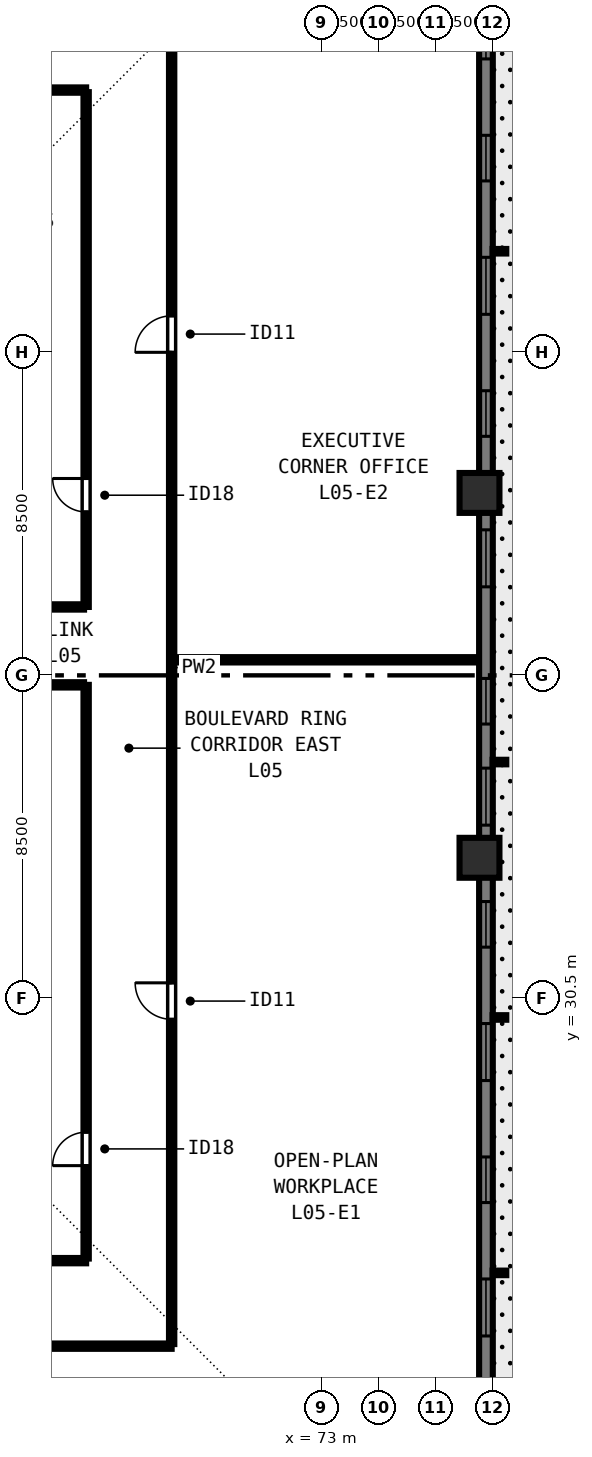
"""IFC4 building model, lengths in metres.
Left out: names, types, materials, properties, quantities, classifications, styles, units other than length and angle.
Written with IfcOpenShell. Run it as: python <this file> out.ifc"""

import sys

from ifc_helpers import new_model, si_unit, direction, frame, frame_2d, origin, origin_2d, place, context, subcontext, project, spatial, rectangle, extrude, element, fill, save


model = new_model("IFC4")
c1 = context("Model", 3, precision=1e-05, world=origin(), true_north=direction((0.0, 1.0)))
c2 = subcontext(c1, "Body", "Model", "MODEL_VIEW")
j1 = project(units=[si_unit("LENGTHUNIT", "METRE"), si_unit("PLANEANGLEUNIT", "RADIAN")], contexts=[c1])
p1 = place(None, origin())
s1 = spatial("IfcSite", under=j1, at=p1, CompositionType="ELEMENT")
p2 = place(p1, origin())
s2 = spatial("IfcBuilding", under=s1, at=p2, CompositionType="ELEMENT")
p3 = place(p2, frame((0.0, 0.0, 23.5)))
s3 = spatial("IfcBuildingStorey", under=s2, at=p3, CompositionType="ELEMENT", Elevation=23.5)
for number, where, z_axis, x_axis in (
    (1, (77.15, 34.2, 0.0), (0.0, 0.0, 1.0), (0.0, 1.0, 0.0)),
    (2, (77.15, 43.8, 0.0), (0.0, 0.0, 1.0), (0.0, 1.0, 0.0)),
):
    element("IfcColumn", number, at=place(p3, frame(where, z_axis=z_axis, x_axis=x_axis)), inside=s3, PredefinedType="COLUMN", context=c2, shape_type="SweptSolid", body=[
        extrude(rectangle(XDim=1.05, YDim=1.05, at=origin_2d()), origin(), (0.0, 0.0, 1.0), 3.5),
    ])
p4 = place(p3, frame((77.32, 61.5, 0.0), z_axis=(0.0, 0.0, 1.0), x_axis=(0.0, -1.0, 0.0)))
e3 = element("IfcWall", 3, at=p4, inside=s3, PredefinedType="SOLIDWALL", context=c2, shape_type="SweptSolid", body=[
    extrude(rectangle(XDim=44.662, YDim=0.36, at=frame_2d((22.331, 0.0))), origin(), (0.0, 0.0, 1.0), 3.28),
])
p5 = place(p4, frame((4.78, 0.0, 0.8)))
e4 = element("IfcOpeningElement", 4, at=p5, cuts=e3, PredefinedType="OPENING", context=c2, shape_type="SweptSolid", body=[
    extrude(rectangle(XDim=1.5, YDim=1.544, at=frame_2d((0.75, 0.772))), frame((0.0, 0.19, 0.0), z_axis=(0.0, -1.0, 0.0), x_axis=(1.0, 0.0, 0.0)), (0.0, 0.0, 1.0), 0.38),
])
p6 = place(p4, frame((8.29, 0.0, 0.8)))
e5 = element("IfcOpeningElement", 5, at=p6, cuts=e3, PredefinedType="OPENING", context=c2, shape_type="SweptSolid", body=[
    extrude(rectangle(XDim=1.2, YDim=1.544, at=frame_2d((0.6, 0.772))), frame((0.0, 0.19, 0.0), z_axis=(0.0, -1.0, 0.0), x_axis=(1.0, 0.0, 0.0)), (0.0, 0.0, 1.0), 0.38),
])
p7 = place(p4, frame((11.5, 0.0, 0.8)))
e6 = element("IfcOpeningElement", 6, at=p7, cuts=e3, PredefinedType="OPENING", context=c2, shape_type="SweptSolid", body=[
    extrude(rectangle(XDim=1.5, YDim=1.544, at=frame_2d((0.75, 0.772))), frame((0.0, 0.19, 0.0), z_axis=(0.0, -1.0, 0.0), x_axis=(1.0, 0.0, 0.0)), (0.0, 0.0, 1.0), 0.38),
])
p8 = place(p4, frame((15.01, 0.0, 0.8)))
e7 = element("IfcOpeningElement", 7, at=p8, cuts=e3, PredefinedType="OPENING", context=c2, shape_type="SweptSolid", body=[
    extrude(rectangle(XDim=1.2, YDim=1.544, at=frame_2d((0.6, 0.772))), frame((0.0, 0.19, 0.0), z_axis=(0.0, -1.0, 0.0), x_axis=(1.0, 0.0, 0.0)), (0.0, 0.0, 1.0), 0.38),
])
p9 = place(p4, frame((18.671, 0.0, 0.8)))
e8 = element("IfcOpeningElement", 8, at=p9, cuts=e3, PredefinedType="OPENING", context=c2, shape_type="SweptSolid", body=[
    extrude(rectangle(XDim=1.5, YDim=1.544, at=frame_2d((0.75, 0.772))), frame((0.0, 0.19, 0.0), z_axis=(0.0, -1.0, 0.0), x_axis=(1.0, 0.0, 0.0)), (0.0, 0.0, 1.0), 0.38),
])
p10 = place(p4, frame((22.581, 0.0, 0.8)))
e9 = element("IfcOpeningElement", 9, at=p10, cuts=e3, PredefinedType="OPENING", context=c2, shape_type="SweptSolid", body=[
    extrude(rectangle(XDim=1.2, YDim=1.544, at=frame_2d((0.6, 0.772))), frame((0.0, 0.19, 0.0), z_axis=(0.0, -1.0, 0.0), x_axis=(1.0, 0.0, 0.0)), (0.0, 0.0, 1.0), 0.38),
])
p11 = place(p4, frame((24.941, 0.0, 0.8)))
e10 = element("IfcOpeningElement", 10, at=p11, cuts=e3, PredefinedType="OPENING", context=c2, shape_type="SweptSolid", body=[
    extrude(rectangle(XDim=1.5, YDim=1.544, at=frame_2d((0.75, 0.772))), frame((0.0, 0.19, 0.0), z_axis=(0.0, -1.0, 0.0), x_axis=(1.0, 0.0, 0.0)), (0.0, 0.0, 1.0), 0.38),
])
p12 = place(p4, frame((28.451, 0.0, 0.8)))
e11 = element("IfcOpeningElement", 11, at=p12, cuts=e3, PredefinedType="OPENING", context=c2, shape_type="SweptSolid", body=[
    extrude(rectangle(XDim=1.2, YDim=1.544, at=frame_2d((0.6, 0.772))), frame((0.0, 0.19, 0.0), z_axis=(0.0, -1.0, 0.0), x_axis=(1.0, 0.0, 0.0)), (0.0, 0.0, 1.0), 0.38),
])
p13 = place(p4, frame((31.662, 0.0, 0.8)))
e12 = element("IfcOpeningElement", 12, at=p13, cuts=e3, PredefinedType="OPENING", context=c2, shape_type="SweptSolid", body=[
    extrude(rectangle(XDim=1.5, YDim=1.544, at=frame_2d((0.75, 0.772))), frame((0.0, 0.19, 0.0), z_axis=(0.0, -1.0, 0.0), x_axis=(1.0, 0.0, 0.0)), (0.0, 0.0, 1.0), 0.38),
])
p14 = place(p4, frame((35.172, 0.0, 0.8)))
e13 = element("IfcOpeningElement", 13, at=p14, cuts=e3, PredefinedType="OPENING", context=c2, shape_type="SweptSolid", body=[
    extrude(rectangle(XDim=1.2, YDim=1.544, at=frame_2d((0.6, 0.772))), frame((0.0, 0.19, 0.0), z_axis=(0.0, -1.0, 0.0), x_axis=(1.0, 0.0, 0.0)), (0.0, 0.0, 1.0), 0.38),
])
p15 = place(p4, frame((38.382, 0.0, 0.8)))
e14 = element("IfcOpeningElement", 14, at=p15, cuts=e3, PredefinedType="OPENING", context=c2, shape_type="SweptSolid", body=[
    extrude(rectangle(XDim=1.5, YDim=1.544, at=frame_2d((0.75, 0.772))), frame((0.0, 0.19, 0.0), z_axis=(0.0, -1.0, 0.0), x_axis=(1.0, 0.0, 0.0)), (0.0, 0.0, 1.0), 0.38),
])
p16 = place(p3, frame((34.95, 21.35, 0.0), z_axis=(0.0, 0.0, 1.0), x_axis=(1.0, 0.0, 0.0)))
e15 = element("IfcWall", 15, at=p16, inside=s3, PredefinedType="PARTITIONING", context=c2, shape_type="SweptSolid", body=[
    extrude(rectangle(XDim=34.1, YDim=0.14, at=frame_2d((17.05, 0.0))), origin(), (0.0, 0.0, 1.0), 3.28),
])
p17 = place(p16, frame((3.938, 0.0, 0.0)))
e16 = element("IfcOpeningElement", 16, at=p17, cuts=e15, PredefinedType="OPENING", context=c2, shape_type="SweptSolid", body=[
    extrude(rectangle(XDim=0.96, YDim=2.12, at=frame_2d((0.48, 1.06))), frame((0.0, 0.08, 0.0), z_axis=(0.0, -1.0, 0.0), x_axis=(1.0, 0.0, 0.0)), (0.0, 0.0, 1.0), 0.16),
])
p18 = place(p16, frame((28.617, 0.0, 0.0)))
e17 = element("IfcOpeningElement", 17, at=p18, cuts=e15, PredefinedType="OPENING", context=c2, shape_type="SweptSolid", body=[
    extrude(rectangle(XDim=0.96, YDim=2.12, at=frame_2d((0.48, 1.06))), frame((0.0, 0.08, 0.0), z_axis=(0.0, -1.0, 0.0), x_axis=(1.0, 0.0, 0.0)), (0.0, 0.0, 1.0), 0.16),
])
p19 = place(p3, frame((69.05, 21.405, 0.0), z_axis=(0.0, 0.0, 1.0), x_axis=(0.0, 1.0, 0.0)))
e18 = element("IfcWall", 18, at=p19, inside=s3, PredefinedType="PARTITIONING", context=c2, shape_type="SweptSolid", body=[
    extrude(rectangle(XDim=35.19, YDim=0.14, at=frame_2d((17.595, 0.0))), origin(), (0.0, 0.0, 1.0), 3.28),
])
p20 = place(p19, frame((8.545, 0.0, 0.0)))
e19 = element("IfcOpeningElement", 19, at=p20, cuts=e18, PredefinedType="OPENING", context=c2, shape_type="SweptSolid", body=[
    extrude(rectangle(XDim=0.96, YDim=2.12, at=frame_2d((0.48, 1.06))), frame((0.0, 0.08, 0.0), z_axis=(0.0, -1.0, 0.0), x_axis=(1.0, 0.0, 0.0)), (0.0, 0.0, 1.0), 0.16),
])
p21 = place(p19, frame((26.095, 0.0, 0.0)))
e20 = element("IfcOpeningElement", 20, at=p21, cuts=e18, PredefinedType="OPENING", context=c2, shape_type="SweptSolid", body=[
    extrude(rectangle(XDim=0.96, YDim=2.12, at=frame_2d((0.48, 1.06))), frame((0.0, 0.08, 0.0), z_axis=(0.0, -1.0, 0.0), x_axis=(1.0, 0.0, 0.0)), (0.0, 0.0, 1.0), 0.16),
])
p22 = place(p3, frame((37.2, 23.6, 0.0), z_axis=(0.0, 0.0, 1.0), x_axis=(1.0, 0.0, 0.0)))
e21 = element("IfcWall", 21, at=p22, inside=s3, PredefinedType="PARTITIONING", context=c2, shape_type="SweptSolid", body=[
    extrude(rectangle(XDim=29.6, YDim=0.14, at=frame_2d((14.8, 0.0))), origin(), (0.0, 0.0, 1.0), 3.28),
])
p23 = place(p22, frame((1.2, 0.0, 0.0)))
e22 = element("IfcOpeningElement", 22, at=p23, cuts=e21, PredefinedType="OPENING", context=c2, shape_type="SweptSolid", body=[
    extrude(rectangle(XDim=0.88, YDim=2.1, at=frame_2d((0.44, 1.05))), frame((0.0, 0.08, 0.0), z_axis=(0.0, -1.0, 0.0), x_axis=(1.0, 0.0, 0.0)), (0.0, 0.0, 1.0), 0.16),
])
p24 = place(p22, frame((11.3, 0.0, 0.0)))
e23 = element("IfcOpeningElement", 23, at=p24, cuts=e21, PredefinedType="OPENING", context=c2, shape_type="SweptSolid", body=[
    extrude(rectangle(XDim=0.88, YDim=2.1, at=frame_2d((0.44, 1.05))), frame((0.0, 0.08, 0.0), z_axis=(0.0, -1.0, 0.0), x_axis=(1.0, 0.0, 0.0)), (0.0, 0.0, 1.0), 0.16),
])
p25 = place(p22, frame((21.8, 0.0, 0.0)))
e24 = element("IfcOpeningElement", 24, at=p25, cuts=e21, PredefinedType="OPENING", context=c2, shape_type="SweptSolid", body=[
    extrude(rectangle(XDim=0.88, YDim=2.1, at=frame_2d((0.44, 1.05))), frame((0.0, 0.08, 0.0), z_axis=(0.0, -1.0, 0.0), x_axis=(1.0, 0.0, 0.0)), (0.0, 0.0, 1.0), 0.16),
])
p26 = place(p3, frame((37.2, 54.4, 0.0), z_axis=(0.0, 0.0, 1.0), x_axis=(1.0, 0.0, 0.0)))
e25 = element("IfcWall", 25, at=p26, inside=s3, PredefinedType="PARTITIONING", context=c2, shape_type="SweptSolid", body=[
    extrude(rectangle(XDim=29.6, YDim=0.14, at=frame_2d((14.8, 0.0))), origin(), (0.0, 0.0, 1.0), 3.28),
])
p27 = place(p26, frame((2.2, 0.0, 0.0)))
e26 = element("IfcOpeningElement", 26, at=p27, cuts=e25, PredefinedType="OPENING", context=c2, shape_type="SweptSolid", body=[
    extrude(rectangle(XDim=0.88, YDim=2.1, at=frame_2d((0.44, 1.05))), frame((0.0, 0.08, 0.0), z_axis=(0.0, -1.0, 0.0), x_axis=(1.0, 0.0, 0.0)), (0.0, 0.0, 1.0), 0.16),
])
p28 = place(p26, frame((15.3, 0.0, 0.0)))
e27 = element("IfcOpeningElement", 27, at=p28, cuts=e25, PredefinedType="OPENING", context=c2, shape_type="SweptSolid", body=[
    extrude(rectangle(XDim=0.88, YDim=2.1, at=frame_2d((0.44, 1.05))), frame((0.0, 0.08, 0.0), z_axis=(0.0, -1.0, 0.0), x_axis=(1.0, 0.0, 0.0)), (0.0, 0.0, 1.0), 0.16),
])
p29 = place(p26, frame((24.8, 0.0, 0.0)))
e28 = element("IfcOpeningElement", 28, at=p29, cuts=e25, PredefinedType="OPENING", context=c2, shape_type="SweptSolid", body=[
    extrude(rectangle(XDim=0.88, YDim=2.1, at=frame_2d((0.44, 1.05))), frame((0.0, 0.08, 0.0), z_axis=(0.0, -1.0, 0.0), x_axis=(1.0, 0.0, 0.0)), (0.0, 0.0, 1.0), 0.16),
])
p30 = place(p3, frame((66.8, 23.655, 0.0), z_axis=(0.0, 0.0, 1.0), x_axis=(0.0, 1.0, 0.0)))
e29 = element("IfcWall", 29, at=p30, inside=s3, PredefinedType="PARTITIONING", context=c2, shape_type="SweptSolid", body=[
    extrude(rectangle(XDim=15.095, YDim=0.14, at=frame_2d((7.547, 0.0))), origin(), (0.0, 0.0, 1.0), 3.28),
])
p31 = place(p30, frame((2.445, 0.0, 0.0)))
e30 = element("IfcOpeningElement", 30, at=p31, cuts=e29, PredefinedType="OPENING", context=c2, shape_type="SweptSolid", body=[
    extrude(rectangle(XDim=0.88, YDim=2.1, at=frame_2d((0.44, 1.05))), frame((0.0, 0.08, 0.0), z_axis=(0.0, -1.0, 0.0), x_axis=(1.0, 0.0, 0.0)), (0.0, 0.0, 1.0), 0.16),
])
p32 = place(p3, frame((66.8, 40.8, 0.0), z_axis=(0.0, 0.0, 1.0), x_axis=(0.0, 1.0, 0.0)))
e31 = element("IfcWall", 31, at=p32, inside=s3, PredefinedType="PARTITIONING", context=c2, shape_type="SweptSolid", body=[
    extrude(rectangle(XDim=13.545, YDim=0.14, at=frame_2d((6.772, 0.0))), origin(), (0.0, 0.0, 1.0), 3.28),
])
p33 = place(p32, frame((2.5, 0.0, 0.0)))
e32 = element("IfcOpeningElement", 32, at=p33, cuts=e31, PredefinedType="OPENING", context=c2, shape_type="SweptSolid", body=[
    extrude(rectangle(XDim=0.88, YDim=2.1, at=frame_2d((0.44, 1.05))), frame((0.0, 0.08, 0.0), z_axis=(0.0, -1.0, 0.0), x_axis=(1.0, 0.0, 0.0)), (0.0, 0.0, 1.0), 0.16),
])
for number, where, z_axis, x_axis in (
    (33, (60.76, 38.75, 0.0), (0.0, 0.0, 1.0), (1.0, 0.0, 0.0)),
    (34, (60.76, 40.8, 0.0), (0.0, 0.0, 1.0), (1.0, 0.0, 0.0)),
):
    element("IfcWall", number, at=place(p3, frame(where, z_axis=z_axis, x_axis=x_axis)), inside=s3, PredefinedType="PARTITIONING", context=c2, shape_type="SweptSolid", body=[
        extrude(rectangle(XDim=5.985, YDim=0.14, at=frame_2d((2.993, 0.0))), origin(), (0.0, 0.0, 1.0), 3.28),
    ])
p34 = place(p3, frame((69.15, 39.409, 0.0), z_axis=(0.0, 0.0, 1.0), x_axis=(1.0, 0.0, 0.0)))
e35 = element("IfcWall", 35, at=p34, inside=s3, PredefinedType="PARTITIONING", context=c2, shape_type="SweptSolid", body=[
    extrude(rectangle(XDim=7.93, YDim=0.14, at=frame_2d((3.965, 0.0))), origin(), (0.0, 0.0, 1.0), 3.28),
])
p35 = place(p5, origin())
e36 = element("IfcWindow", 36, at=p35, inside=s3, PartitioningType="SINGLE_PANEL", PredefinedType="WINDOW", context=c2, shape_type="SweptSolid", body=[
    extrude(rectangle(XDim=1.5, YDim=1.544, at=frame_2d((0.75, 0.772))), frame((0.0, -0.05, 0.0), z_axis=(0.0, -1.0, 0.0), x_axis=(1.0, 0.0, 0.0)), (0.0, 0.0, 1.0), 0.06),
])
fill(e4, e36)
p36 = place(p6, origin())
e37 = element("IfcWindow", 37, at=p36, inside=s3, PartitioningType="SINGLE_PANEL", PredefinedType="WINDOW", context=c2, shape_type="SweptSolid", body=[
    extrude(rectangle(XDim=1.2, YDim=1.544, at=frame_2d((0.6, 0.772))), frame((0.0, -0.05, 0.0), z_axis=(0.0, -1.0, 0.0), x_axis=(1.0, 0.0, 0.0)), (0.0, 0.0, 1.0), 0.06),
])
fill(e5, e37)
p37 = place(p7, origin())
e38 = element("IfcWindow", 38, at=p37, inside=s3, PartitioningType="SINGLE_PANEL", PredefinedType="WINDOW", context=c2, shape_type="SweptSolid", body=[
    extrude(rectangle(XDim=1.5, YDim=1.544, at=frame_2d((0.75, 0.772))), frame((0.0, -0.05, 0.0), z_axis=(0.0, -1.0, 0.0), x_axis=(1.0, 0.0, 0.0)), (0.0, 0.0, 1.0), 0.06),
])
fill(e6, e38)
p38 = place(p8, origin())
e39 = element("IfcWindow", 39, at=p38, inside=s3, PartitioningType="SINGLE_PANEL", PredefinedType="WINDOW", context=c2, shape_type="SweptSolid", body=[
    extrude(rectangle(XDim=1.2, YDim=1.544, at=frame_2d((0.6, 0.772))), frame((0.0, -0.05, 0.0), z_axis=(0.0, -1.0, 0.0), x_axis=(1.0, 0.0, 0.0)), (0.0, 0.0, 1.0), 0.06),
])
fill(e7, e39)
p39 = place(p9, origin())
e40 = element("IfcWindow", 40, at=p39, inside=s3, PartitioningType="SINGLE_PANEL", PredefinedType="WINDOW", context=c2, shape_type="SweptSolid", body=[
    extrude(rectangle(XDim=1.5, YDim=1.544, at=frame_2d((0.75, 0.772))), frame((0.0, -0.05, 0.0), z_axis=(0.0, -1.0, 0.0), x_axis=(1.0, 0.0, 0.0)), (0.0, 0.0, 1.0), 0.06),
])
fill(e8, e40)
p40 = place(p10, origin())
e41 = element("IfcWindow", 41, at=p40, inside=s3, PartitioningType="SINGLE_PANEL", PredefinedType="WINDOW", context=c2, shape_type="SweptSolid", body=[
    extrude(rectangle(XDim=1.2, YDim=1.544, at=frame_2d((0.6, 0.772))), frame((0.0, -0.05, 0.0), z_axis=(0.0, -1.0, 0.0), x_axis=(1.0, 0.0, 0.0)), (0.0, 0.0, 1.0), 0.06),
])
fill(e9, e41)
p41 = place(p11, origin())
e42 = element("IfcWindow", 42, at=p41, inside=s3, PartitioningType="SINGLE_PANEL", PredefinedType="WINDOW", context=c2, shape_type="SweptSolid", body=[
    extrude(rectangle(XDim=1.5, YDim=1.544, at=frame_2d((0.75, 0.772))), frame((0.0, -0.05, 0.0), z_axis=(0.0, -1.0, 0.0), x_axis=(1.0, 0.0, 0.0)), (0.0, 0.0, 1.0), 0.06),
])
fill(e10, e42)
p42 = place(p12, origin())
e43 = element("IfcWindow", 43, at=p42, inside=s3, PartitioningType="SINGLE_PANEL", PredefinedType="WINDOW", context=c2, shape_type="SweptSolid", body=[
    extrude(rectangle(XDim=1.2, YDim=1.544, at=frame_2d((0.6, 0.772))), frame((0.0, -0.05, 0.0), z_axis=(0.0, -1.0, 0.0), x_axis=(1.0, 0.0, 0.0)), (0.0, 0.0, 1.0), 0.06),
])
fill(e11, e43)
p43 = place(p13, origin())
e44 = element("IfcWindow", 44, at=p43, inside=s3, PartitioningType="SINGLE_PANEL", PredefinedType="WINDOW", context=c2, shape_type="SweptSolid", body=[
    extrude(rectangle(XDim=1.5, YDim=1.544, at=frame_2d((0.75, 0.772))), frame((0.0, -0.05, 0.0), z_axis=(0.0, -1.0, 0.0), x_axis=(1.0, 0.0, 0.0)), (0.0, 0.0, 1.0), 0.06),
])
fill(e12, e44)
p44 = place(p14, origin())
e45 = element("IfcWindow", 45, at=p44, inside=s3, PartitioningType="SINGLE_PANEL", PredefinedType="WINDOW", context=c2, shape_type="SweptSolid", body=[
    extrude(rectangle(XDim=1.2, YDim=1.544, at=frame_2d((0.6, 0.772))), frame((0.0, -0.05, 0.0), z_axis=(0.0, -1.0, 0.0), x_axis=(1.0, 0.0, 0.0)), (0.0, 0.0, 1.0), 0.06),
])
fill(e13, e45)
p45 = place(p15, origin())
e46 = element("IfcWindow", 46, at=p45, inside=s3, PartitioningType="SINGLE_PANEL", PredefinedType="WINDOW", context=c2, shape_type="SweptSolid", body=[
    extrude(rectangle(XDim=1.5, YDim=1.544, at=frame_2d((0.75, 0.772))), frame((0.0, -0.05, 0.0), z_axis=(0.0, -1.0, 0.0), x_axis=(1.0, 0.0, 0.0)), (0.0, 0.0, 1.0), 0.06),
])
fill(e14, e46)
p46 = place(p31, origin())
e47 = element("IfcDoor", 47, at=p46, inside=s3, OperationType="SINGLE_SWING_LEFT", PredefinedType="DOOR", context=c2, shape_type="SweptSolid", body=[
    extrude(rectangle(XDim=0.88, YDim=2.1, at=frame_2d((0.44, 1.05))), frame((0.0, 0.025, 0.0), z_axis=(0.0, -1.0, 0.0), x_axis=(1.0, 0.0, 0.0)), (0.0, 0.0, 1.0), 0.05),
])
fill(e30, e47)
p47 = place(p33, origin())
e48 = element("IfcDoor", 48, at=p47, inside=s3, OperationType="SINGLE_SWING_RIGHT", PredefinedType="DOOR", context=c2, shape_type="SweptSolid", body=[
    extrude(rectangle(XDim=0.88, YDim=2.1, at=frame_2d((0.44, 1.05))), frame((0.0, 0.025, 0.0), z_axis=(0.0, -1.0, 0.0), x_axis=(1.0, 0.0, 0.0)), (0.0, 0.0, 1.0), 0.05),
])
fill(e32, e48)
p48 = place(p20, origin())
e49 = element("IfcDoor", 49, at=p48, inside=s3, OperationType="SINGLE_SWING_RIGHT", PredefinedType="DOOR", context=c2, shape_type="SweptSolid", body=[
    extrude(rectangle(XDim=0.96, YDim=2.12, at=frame_2d((0.48, 1.06))), frame((0.0, 0.025, 0.0), z_axis=(0.0, -1.0, 0.0), x_axis=(1.0, 0.0, 0.0)), (0.0, 0.0, 1.0), 0.05),
])
fill(e19, e49)
p49 = place(p21, origin())
e50 = element("IfcDoor", 50, at=p49, inside=s3, OperationType="SINGLE_SWING_LEFT", PredefinedType="DOOR", context=c2, shape_type="SweptSolid", body=[
    extrude(rectangle(XDim=0.96, YDim=2.12, at=frame_2d((0.48, 1.06))), frame((0.0, 0.025, 0.0), z_axis=(0.0, -1.0, 0.0), x_axis=(1.0, 0.0, 0.0)), (0.0, 0.0, 1.0), 0.05),
])
fill(e20, e50)
save(model, sys.argv[1])
